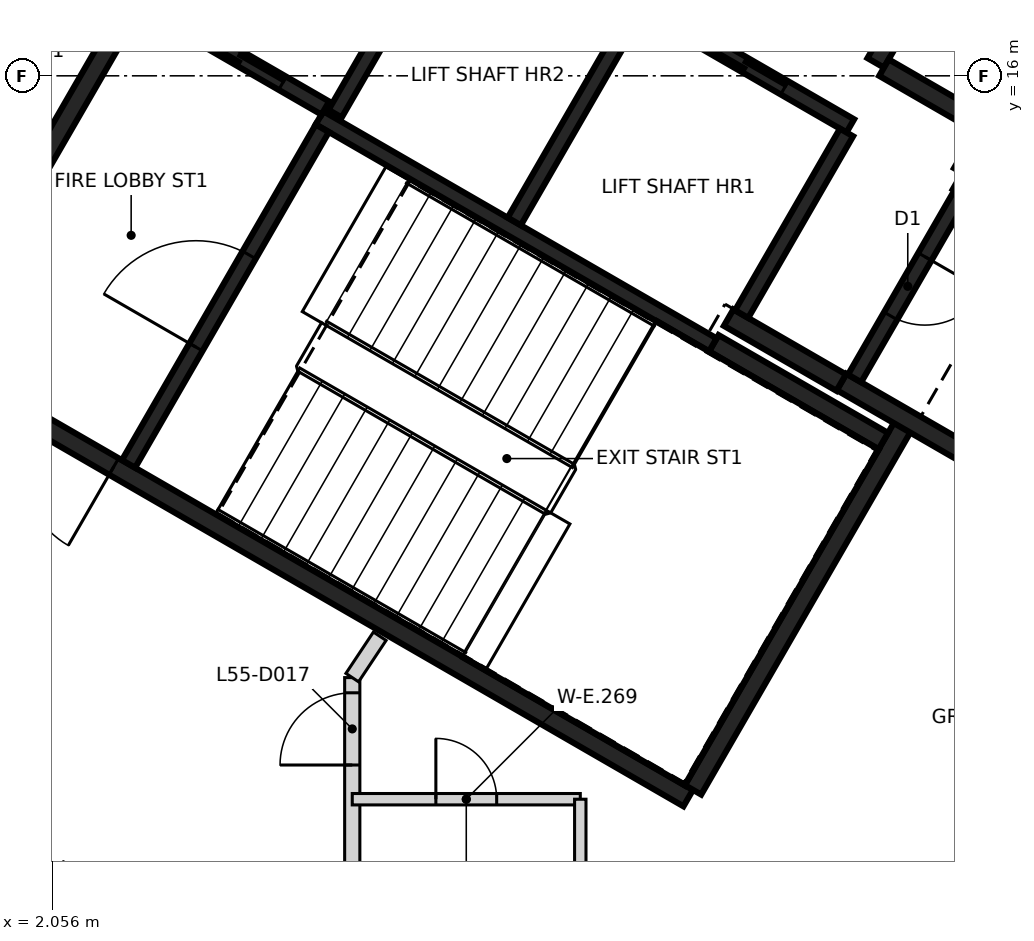
"""IFC4 building model, lengths in metres.
Left out: names, types, materials, properties, quantities, classifications, styles, units other than length and angle.
Written with IfcOpenShell. Run it as: python <this file> out.ifc"""

import sys

from ifc_helpers import new_model, si_unit, direction, frame, frame_2d, origin, place, context, subcontext, project, spatial, rectangle, extrude, element, fill, save


model = new_model("IFC4")
c1 = context("Model", 3, precision=1e-05, world=origin(), true_north=direction((0.0, 1.0)))
c2 = subcontext(c1, "Body", "Model", "MODEL_VIEW")
j1 = project(units=[si_unit("LENGTHUNIT", "METRE"), si_unit("PLANEANGLEUNIT", "RADIAN")], contexts=[c1])
p1 = place(None, origin())
s1 = spatial("IfcSite", under=j1, at=p1, CompositionType="ELEMENT")
p2 = place(p1, origin())
s2 = spatial("IfcBuilding", under=s1, at=p2, CompositionType="ELEMENT")
p3 = place(p2, frame((0.0, 0.0, 221.4)))
s3 = spatial("IfcBuildingStorey", under=s2, at=p3, CompositionType="ELEMENT", Elevation=221.4)
p4 = place(p3, frame((10.42, 6.498, 0.0), z_axis=(0.0, 0.0, 1.0), x_axis=(-0.866021906294, 0.500006057782, 0.0)))
e1 = element("IfcWall", 1, at=p4, inside=s3, PredefinedType="SHEAR", context=c2, shape_type="SweptSolid", body=[
    extrude(rectangle(XDim=11.55, YDim=0.25, at=frame_2d((5.775, 0.0))), origin(), (0.0, 0.0, 1.0), 3.25),
])
p5 = place(p4, frame((10.025, 0.0, 0.0)))
e2 = element("IfcOpeningElement", 2, at=p5, cuts=e1, PredefinedType="OPENING", context=c2, shape_type="SweptSolid", body=[
    extrude(rectangle(XDim=1.2, YDim=2.1, at=frame_2d((0.6, 1.05))), frame((0.0, 0.135, 0.0), z_axis=(0.0, -1.0, 0.0), x_axis=(1.0, 0.0, 0.0)), (0.0, 0.0, 1.0), 0.27),
])
p6 = place(p4, frame((8.725, 0.0, 0.0)))
e3 = element("IfcOpeningElement", 3, at=p6, cuts=e1, PredefinedType="OPENING", context=c2, shape_type="SweptSolid", body=[
    extrude(rectangle(XDim=1.2, YDim=2.1, at=frame_2d((0.6, 1.05))), frame((0.0, 0.135, 0.0), z_axis=(0.0, -1.0, 0.0), x_axis=(1.0, 0.0, 0.0)), (0.0, 0.0, 1.0), 0.27),
])
p7 = place(p3, frame((0.48, 12.381, 0.0), z_axis=(0.0, 0.0, 1.0), x_axis=(0.49999885962, 0.866026062182, 0.0)))
e4 = element("IfcWall", 4, at=p7, inside=s3, PredefinedType="SHEAR", context=c2, shape_type="SweptSolid", body=[
    extrude(rectangle(XDim=5.225, YDim=0.25, at=frame_2d((2.612, 0.0))), origin(), (0.0, 0.0, 1.0), 3.25),
])
p8 = place(p3, frame((13.238, 11.378, 0.0), z_axis=(0.0, 0.0, 1.0), x_axis=(-0.500008851346, -0.866020293397, 0.0)))
e5 = element("IfcWall", 5, at=p8, inside=s3, PredefinedType="SHEAR", context=c2, shape_type="SweptSolid", body=[
    extrude(rectangle(XDim=5.51, YDim=0.25, at=frame_2d((2.755, 0.0))), origin(), (0.0, 0.0, 1.0), 3.25),
])
p9 = place(p3, frame((14.918, 10.54, 0.0), z_axis=(0.0, 0.0, 1.0), x_axis=(-0.866063538972, 0.499933942099, 0.0)))
e6 = element("IfcWall", 6, at=p9, inside=s3, PredefinedType="SHEAR", context=c2, shape_type="SweptSolid", body=[
    extrude(rectangle(XDim=2.865, YDim=0.25, at=frame_2d((1.432, 0.0))), origin(), (0.0, 0.0, 1.0), 3.25),
])
p10 = place(p3, frame((13.963, 14.614, 0.0), z_axis=(0.0, 0.0, 1.0), x_axis=(0.866042235819, -0.499970844928, 0.0)))
e7 = element("IfcWall", 7, at=p10, inside=s3, PredefinedType="SHEAR", context=c2, shape_type="SweptSolid", body=[
    extrude(rectangle(XDim=2.865, YDim=0.25, at=frame_2d((1.432, 0.0))), origin(), (0.0, 0.0, 1.0), 3.25),
])
p11 = place(p3, frame((10.757, 12.481, 0.0), z_axis=(0.0, 0.0, 1.0), x_axis=(0.866022940537, -0.500004266446, 0.0)))
e8 = element("IfcWall", 8, at=p11, inside=s3, PredefinedType="SHEAR", context=c2, shape_type="SweptSolid", body=[
    extrude(rectangle(XDim=2.575, YDim=0.25, at=frame_2d((1.287, 0.0))), origin(), (0.0, 0.0, 1.0), 3.25),
])
p12 = place(p3, frame((13.819, 17.785, 0.0), z_axis=(0.0, 0.0, 1.0), x_axis=(-0.500039802285, -0.866002422705, 0.0)))
e9 = element("IfcWall", 9, at=p12, inside=s3, PredefinedType="SHEAR", context=c2, shape_type="SweptSolid", body=[
    extrude(rectangle(XDim=1.865, YDim=0.25, at=frame_2d((0.932, 0.0))), origin(), (0.0, 0.0, 1.0), 3.25),
])
p13 = place(p3, frame((12.433, 11.964, 0.0), z_axis=(0.0, 0.0, 1.0), x_axis=(-0.866038183914, 0.499977863513, 0.0)))
e10 = element("IfcWall", 10, at=p13, inside=s3, PredefinedType="SHEAR", context=c2, shape_type="SweptSolid", body=[
    extrude(rectangle(XDim=1.71, YDim=0.25, at=frame_2d((0.855, 0.0))), origin(), (0.0, 0.0, 1.0), 3.25),
])
p14 = place(p3, frame((12.995, 16.108, 0.0), z_axis=(0.0, 0.0, 1.0), x_axis=(0.866044474677, -0.49996696679, 0.0)))
e11 = element("IfcWall", 11, at=p14, inside=s3, PredefinedType="SHEAR", context=c2, shape_type="SweptSolid", body=[
    extrude(rectangle(XDim=1.584, YDim=0.25, at=frame_2d((0.792, 0.0))), origin(), (0.0, 0.0, 1.0), 3.25),
])
p15 = place(p3, frame((14.305, 15.207, 0.0), z_axis=(0.0, 0.0, 1.0), x_axis=(-0.499848422343, -0.866112899501, 0.0)))
e12 = element("IfcWall", 12, at=p15, inside=s3, PredefinedType="SHEAR", context=c2, shape_type="SweptSolid", body=[
    extrude(rectangle(XDim=0.559, YDim=0.25, at=frame_2d((0.28, 0.0))), origin(), (0.0, 0.0, 1.0), 3.25),
])
p16 = place(p3, frame((12.552, 15.342, 0.0), z_axis=(0.0, 0.0, 1.0), x_axis=(-0.866030299012, 0.499991521122, 0.0)))
e13 = element("IfcWall", 13, at=p16, inside=s3, PredefinedType="SHEAR", context=c2, shape_type="SweptSolid", body=[
    extrude(rectangle(XDim=6.1, YDim=0.2, at=frame_2d((3.05, 0.0))), origin(), (0.0, 0.0, 1.0), 3.25),
])
p17 = place(p16, frame((1.0, 0.0, 0.0)))
e14 = element("IfcOpeningElement", 14, at=p17, cuts=e13, PredefinedType="OPENING", context=c2, shape_type="SweptSolid", body=[
    extrude(rectangle(XDim=1.2, YDim=2.1, at=frame_2d((0.6, 1.05))), frame((0.0, 0.11, 0.0), z_axis=(0.0, -1.0, 0.0), x_axis=(1.0, 0.0, 0.0)), (0.0, 0.0, 1.0), 0.22),
])
p18 = place(p16, frame((3.982, 0.0, 0.0)))
e15 = element("IfcOpeningElement", 15, at=p18, cuts=e13, PredefinedType="OPENING", context=c2, shape_type="SweptSolid", body=[
    extrude(rectangle(XDim=1.2, YDim=2.1, at=frame_2d((0.6, 1.05))), frame((0.0, 0.11, 0.0), z_axis=(0.0, -1.0, 0.0), x_axis=(1.0, 0.0, 0.0)), (0.0, 0.0, 1.0), 0.22),
])
p19 = place(p3, frame((10.743, 12.46, 0.0), z_axis=(0.0, 0.0, 1.0), x_axis=(-0.866018848283, 0.500011354289, 0.0)))
e16 = element("IfcWall", 16, at=p19, inside=s3, PredefinedType="SHEAR", context=c2, shape_type="SweptSolid", body=[
    extrude(rectangle(XDim=5.974, YDim=0.2, at=frame_2d((2.987, 0.0))), origin(), (0.0, 0.0, 1.0), 3.25),
])
p20 = place(p3, frame((3.057, 10.895, 0.0), z_axis=(0.0, 0.0, 1.0), x_axis=(0.500027839223, 0.866009330205, 0.0)))
e17 = element("IfcWall", 17, at=p20, inside=s3, PredefinedType="SHEAR", context=c2, shape_type="SweptSolid", body=[
    extrude(rectangle(XDim=5.098, YDim=0.2, at=frame_2d((2.549, 0.0))), origin(), (0.0, 0.0, 1.0), 3.25),
])
p21 = place(p20, frame((1.774, 0.0, 0.0)))
e18 = element("IfcOpeningElement", 18, at=p21, cuts=e17, PredefinedType="OPENING", context=c2, shape_type="SweptSolid", body=[
    extrude(rectangle(XDim=1.4, YDim=2.1, at=frame_2d((0.7, 1.05))), frame((0.0, 0.11, 0.0), z_axis=(0.0, -1.0, 0.0), x_axis=(1.0, 0.0, 0.0)), (0.0, 0.0, 1.0), 0.22),
])
p22 = place(p3, frame((8.132, 14.084, 0.0), z_axis=(0.0, 0.0, 1.0), x_axis=(0.500030834389, 0.86600760081, 0.0)))
e19 = element("IfcWall", 19, at=p22, inside=s3, PredefinedType="SHEAR", context=c2, shape_type="SweptSolid", body=[
    extrude(rectangle(XDim=3.198, YDim=0.2, at=frame_2d((1.599, 0.0))), origin(), (0.0, 0.0, 1.0), 3.25),
])
p23 = place(p3, frame((14.008, 14.442, 0.0), z_axis=(0.0, 0.0, 1.0), x_axis=(-0.499986818241, -0.866033014143, 0.0)))
e20 = element("IfcWall", 20, at=p23, inside=s3, PredefinedType="SHEAR", context=c2, shape_type="SweptSolid", body=[
    extrude(rectangle(XDim=2.798, YDim=0.2, at=frame_2d((1.399, 0.0))), origin(), (0.0, 0.0, 1.0), 3.25),
])
p24 = place(p23, frame((0.949, 0.0, 0.0)))
e21 = element("IfcOpeningElement", 21, at=p24, cuts=e20, PredefinedType="OPENING", context=c2, shape_type="SweptSolid", body=[
    extrude(rectangle(XDim=0.9, YDim=2.1, at=frame_2d((0.45, 1.05))), frame((0.0, 0.11, 0.0), z_axis=(0.0, -1.0, 0.0), x_axis=(1.0, 0.0, 0.0)), (0.0, 0.0, 1.0), 0.22),
])
p25 = place(p3, frame((12.502, 15.255, 0.0), z_axis=(0.0, 0.0, 1.0), x_axis=(-0.499965018551, -0.866045599391, 0.0)))
e22 = element("IfcWall", 22, at=p25, inside=s3, PredefinedType="SHEAR", context=c2, shape_type="SweptSolid", body=[
    extrude(rectangle(XDim=2.759, YDim=0.2, at=frame_2d((1.379, 0.0))), origin(), (0.0, 0.0, 1.0), 3.25),
])
p26 = place(p3, frame((7.324, 18.187, 0.0), z_axis=(0.0, 0.0, 1.0), x_axis=(-0.499967891604, -0.866043940782, 0.0)))
e23 = element("IfcWall", 23, at=p26, inside=s3, PredefinedType="SHEAR", context=c2, shape_type="SweptSolid", body=[
    extrude(rectangle(XDim=3.1, YDim=0.2, at=frame_2d((1.55, 0.0))), origin(), (0.0, 0.0, 1.0), 3.25),
])
p27 = place(p3, frame((5.646, 15.576, 0.0), z_axis=(0.0, 0.0, 1.0), x_axis=(-0.866018407898, 0.500012117035, 0.0)))
e24 = element("IfcWall", 24, at=p27, inside=s3, PredefinedType="SHEAR", context=c2, shape_type="SweptSolid", body=[
    extrude(rectangle(XDim=2.651, YDim=0.2, at=frame_2d((1.325, 0.0))), origin(), (0.0, 0.0, 1.0), 3.25),
])
p28 = place(p27, frame((0.652, 0.0, 0.0)))
e25 = element("IfcOpeningElement", 25, at=p28, cuts=e24, PredefinedType="OPENING", context=c2, shape_type="SweptSolid", body=[
    extrude(rectangle(XDim=1.3, YDim=2.1, at=frame_2d((0.65, 1.05))), frame((0.0, 0.11, 0.0), z_axis=(0.0, -1.0, 0.0), x_axis=(1.0, 0.0, 0.0)), (0.0, 0.0, 1.0), 0.22),
])
p29 = place(p3, frame((-1.035, 12.73, 0.0), z_axis=(0.0, 0.0, 1.0), x_axis=(0.46738248691, 0.884055208078, 0.0)))
e26 = element("IfcWall", 26, at=p29, inside=s3, PredefinedType="PARTITIONING", context=c2, shape_type="SweptSolid", body=[
    extrude(rectangle(XDim=8.705, YDim=0.2, at=frame_2d((4.352, 0.0))), origin(), (0.0, 0.0, 1.0), 3.25),
])
p30 = place(p29, frame((5.638, 0.0, 0.0)))
e27 = element("IfcOpeningElement", 27, at=p30, cuts=e26, PredefinedType="OPENING", context=c2, shape_type="SweptSolid", body=[
    extrude(rectangle(XDim=0.95, YDim=2.1, at=frame_2d((0.475, 1.05))), frame((0.0, 0.11, 0.0), z_axis=(0.0, -1.0, 0.0), x_axis=(1.0, 0.0, 0.0)), (0.0, 0.0, 1.0), 0.22),
])
p31 = place(p3, frame((6.0, -4.721, 0.0), z_axis=(0.0, 0.0, 1.0), x_axis=(0.0, 1.0, 0.0)))
e28 = element("IfcWall", 28, at=p31, inside=s3, PredefinedType="PARTITIONING", context=c2, shape_type="SweptSolid", body=[
    extrude(rectangle(XDim=12.804, YDim=0.2, at=frame_2d((6.402, 0.0))), origin(), (0.0, 0.0, 1.0), 3.25),
])
p32 = place(p31, frame((3.979, 0.0, 0.0)))
e29 = element("IfcOpeningElement", 29, at=p32, cuts=e28, PredefinedType="OPENING", context=c2, shape_type="SweptSolid", body=[
    extrude(rectangle(XDim=1.4, YDim=2.1, at=frame_2d((0.7, 1.05))), frame((0.0, 0.11, 0.0), z_axis=(0.0, -1.0, 0.0), x_axis=(1.0, 0.0, 0.0)), (0.0, 0.0, 1.0), 0.22),
])
p33 = place(p31, frame((11.654, 0.0, 0.0)))
e30 = element("IfcOpeningElement", 30, at=p33, cuts=e28, PredefinedType="OPENING", context=c2, shape_type="SweptSolid", body=[
    extrude(rectangle(XDim=0.95, YDim=2.1, at=frame_2d((0.475, 1.05))), frame((0.0, 0.11, 0.0), z_axis=(0.0, -1.0, 0.0), x_axis=(1.0, 0.0, 0.0)), (0.0, 0.0, 1.0), 0.22),
])
p34 = place(p3, frame((6.0, 8.083, 0.0), z_axis=(0.0, 0.0, 1.0), x_axis=(0.553665201502, 0.832739361773, 0.0)))
e31 = element("IfcWall", 31, at=p34, inside=s3, PredefinedType="PARTITIONING", context=c2, shape_type="SweptSolid", body=[
    extrude(rectangle(XDim=0.654, YDim=0.2, at=frame_2d((0.327, 0.0))), origin(), (0.0, 0.0, 1.0), 3.25),
])
p35 = place(p3, frame((6.0, 6.483, 0.0), z_axis=(0.0, 0.0, 1.0), x_axis=(1.0, 0.0, 0.0)))
e32 = element("IfcWall", 32, at=p35, inside=s3, PredefinedType="PARTITIONING", context=c2, shape_type="SweptSolid", body=[
    extrude(rectangle(XDim=3.0, YDim=0.15, at=frame_2d((1.5, 0.0))), origin(), (0.0, 0.0, 1.0), 3.25),
])
p36 = place(p35, frame((1.1, 0.0, 0.0)))
e33 = element("IfcOpeningElement", 33, at=p36, cuts=e32, PredefinedType="OPENING", context=c2, shape_type="SweptSolid", body=[
    extrude(rectangle(XDim=0.8, YDim=2.1, at=frame_2d((0.4, 1.05))), frame((0.0, 0.085, 0.0), z_axis=(0.0, -1.0, 0.0), x_axis=(1.0, 0.0, 0.0)), (0.0, 0.0, 1.0), 0.17),
])
p37 = place(p3, frame((9.0, 4.625, 0.0), z_axis=(0.0, 0.0, 1.0), x_axis=(0.0, 1.0, 0.0)))
e34 = element("IfcWall", 34, at=p37, inside=s3, PredefinedType="PARTITIONING", context=c2, shape_type="SweptSolid", body=[
    extrude(rectangle(XDim=1.858, YDim=0.15, at=frame_2d((0.929, 0.0))), origin(), (0.0, 0.0, 1.0), 3.25),
])
p38 = place(p28, origin())
e35 = element("IfcDoor", 35, at=p38, inside=s3, OperationType="SLIDING_TO_LEFT", PredefinedType="DOOR", context=c2, shape_type="SweptSolid", body=[
    extrude(rectangle(XDim=1.3, YDim=2.1, at=frame_2d((0.65, 1.05))), frame((0.0, 0.025, 0.0), z_axis=(0.0, -1.0, 0.0), x_axis=(1.0, 0.0, 0.0)), (0.0, 0.0, 1.0), 0.05),
])
fill(e25, e35)
p39 = place(p17, origin())
e36 = element("IfcDoor", 36, at=p39, inside=s3, OperationType="DOUBLE_DOOR_SLIDING", PredefinedType="DOOR", context=c2, shape_type="SweptSolid", body=[
    extrude(rectangle(XDim=1.2, YDim=2.1, at=frame_2d((0.6, 1.05))), frame((0.0, 0.025, 0.0), z_axis=(0.0, -1.0, 0.0), x_axis=(1.0, 0.0, 0.0)), (0.0, 0.0, 1.0), 0.05),
])
fill(e14, e36)
p40 = place(p6, origin())
e37 = element("IfcDoor", 37, at=p40, inside=s3, OperationType="SINGLE_SWING_RIGHT", PredefinedType="DOOR", context=c2, shape_type="SweptSolid", body=[
    extrude(rectangle(XDim=1.2, YDim=2.1, at=frame_2d((0.6, 1.05))), frame((0.0, 0.025, 0.0), z_axis=(0.0, -1.0, 0.0), x_axis=(1.0, 0.0, 0.0)), (0.0, 0.0, 1.0), 0.05),
])
fill(e3, e37)
p41 = place(p21, origin())
e38 = element("IfcDoor", 38, at=p41, inside=s3, OperationType="SINGLE_SWING_LEFT", PredefinedType="DOOR", context=c2, shape_type="SweptSolid", body=[
    extrude(rectangle(XDim=1.4, YDim=2.1, at=frame_2d((0.7, 1.05))), frame((0.0, 0.025, 0.0), z_axis=(0.0, -1.0, 0.0), x_axis=(1.0, 0.0, 0.0)), (0.0, 0.0, 1.0), 0.05),
])
fill(e18, e38)
p42 = place(p24, origin())
e39 = element("IfcDoor", 39, at=p42, inside=s3, OperationType="SINGLE_SWING_RIGHT", PredefinedType="DOOR", context=c2, shape_type="SweptSolid", body=[
    extrude(rectangle(XDim=0.9, YDim=2.1, at=frame_2d((0.45, 1.05))), frame((0.0, 0.025, 0.0), z_axis=(0.0, -1.0, 0.0), x_axis=(1.0, 0.0, 0.0)), (0.0, 0.0, 1.0), 0.05),
])
fill(e21, e39)
p43 = place(p33, frame((0.95, 0.0, 0.0), z_axis=(0.0, 0.0, 1.0), x_axis=(-1.0, 0.0, 0.0)))
e40 = element("IfcDoor", 40, at=p43, inside=s3, OperationType="SINGLE_SWING_LEFT", PredefinedType="DOOR", context=c2, shape_type="SweptSolid", body=[
    extrude(rectangle(XDim=0.95, YDim=2.1, at=frame_2d((0.475, 1.05))), frame((0.0, 0.025, 0.0), z_axis=(0.0, -1.0, 0.0), x_axis=(1.0, 0.0, 0.0)), (0.0, 0.0, 1.0), 0.05),
])
fill(e30, e40)
p44 = place(p36, origin())
e41 = element("IfcDoor", 41, at=p44, inside=s3, OperationType="SINGLE_SWING_LEFT", PredefinedType="DOOR", context=c2, shape_type="SweptSolid", body=[
    extrude(rectangle(XDim=0.8, YDim=2.1, at=frame_2d((0.4, 1.05))), frame((0.0, 0.025, 0.0), z_axis=(0.0, -1.0, 0.0), x_axis=(1.0, 0.0, 0.0)), (0.0, 0.0, 1.0), 0.05),
])
fill(e33, e41)
save(model, sys.argv[1])
